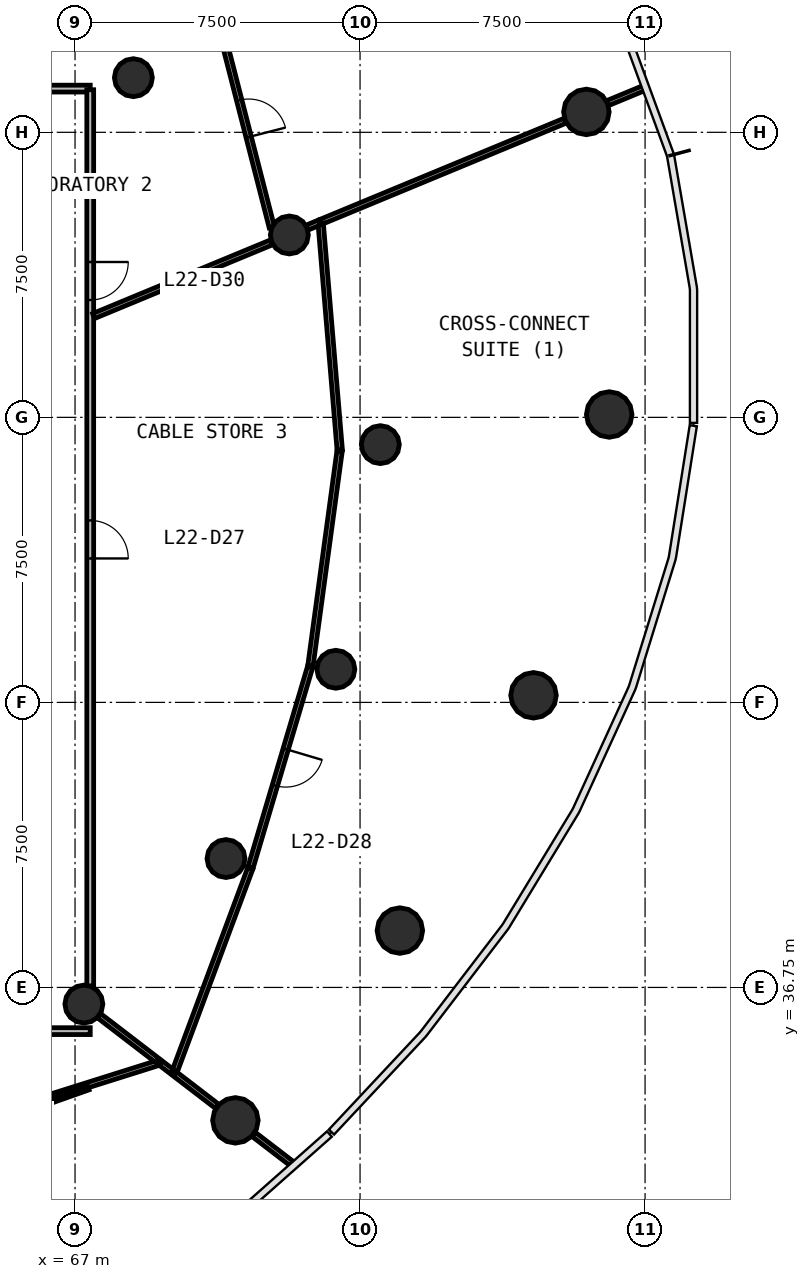
"""IFC4 building model, lengths in metres.
Left out: names, types, materials, properties, quantities, classifications, styles, units other than length and angle.
Written with IfcOpenShell. Run it as: python <this file> out.ifc"""

import sys

from ifc_helpers import new_model, si_unit, direction, frame, frame_2d, origin, origin_2d, place, context, subcontext, project, spatial, rectangle, circle, extrude, source, transform, mapped, element, fill, save


model = new_model("IFC4")
c1 = context("Model", 3, precision=1e-05, world=origin(), true_north=direction((0.0, 1.0)))
c2 = subcontext(c1, "Body", "Model", "MODEL_VIEW")
j1 = project(units=[si_unit("LENGTHUNIT", "METRE"), si_unit("PLANEANGLEUNIT", "RADIAN")], contexts=[c1])
p1 = place(None, origin())
s1 = spatial("IfcSite", under=j1, at=p1, CompositionType="ELEMENT")
p2 = place(p1, origin())
s2 = spatial("IfcBuilding", under=s1, at=p2, CompositionType="ELEMENT")
p3 = place(p2, frame((0.0, 0.0, 96.2)))
s3 = spatial("IfcBuildingStorey", under=s2, at=p3, CompositionType="ELEMENT", Elevation=96.2)
m1 = source(origin(), c2, "Body", "SweptSolid", [
    extrude(circle(Radius=0.6, at=origin_2d()), origin(), (0.0, 0.0, 1.0), 4.1),
])
for number, where, z_axis, x_axis in (
    (1, (81.056, 51.825, 0.0), (0.0, 0.0, 1.0), (1.0, 0.0, 0.0)),
    (2, (80.456, 59.787, 0.0), (0.0, 0.0, 1.0), (1.0, 0.0, 0.0)),
    (3, (71.22, 33.252, 0.0), (0.0, 0.0, 1.0), (1.0, 0.0, 0.0)),
    (4, (75.548, 38.246, 0.0), (0.0, 0.0, 1.0), (1.0, 0.0, 0.0)),
    (5, (79.064, 44.437, 0.0), (0.0, 0.0, 1.0), (1.0, 0.0, 0.0)),
):
    element("IfcColumn", number, at=place(p3, frame(where, z_axis=z_axis, x_axis=x_axis)), inside=s3, PredefinedType="COLUMN", context=c2, shape_type="MappedRepresentation", body=[
        mapped(m1, transform((0.0, 0.0, 0.0), scale=1.0)),
    ])
m2 = source(origin(), c2, "Body", "SweptSolid", [
    extrude(circle(Radius=0.5, at=origin_2d()), origin(), (0.0, 0.0, 1.0), 4.1),
])
for number, where, z_axis, x_axis in (
    (6, (75.034, 51.032, 0.0), (0.0, 0.0, 1.0), (1.0, 0.0, 0.0)),
    (7, (72.639, 56.549, 0.0), (0.0, 0.0, 1.0), (1.0, 0.0, 0.0)),
    (8, (68.535, 60.688, 0.0), (0.0, 0.0, 1.0), (1.0, 0.0, 0.0)),
    (9, (67.232, 36.312, 0.0), (0.0, 0.0, 1.0), (1.0, 0.0, 0.0)),
    (10, (70.972, 40.141, 0.0), (0.0, 0.0, 1.0), (1.0, 0.0, 0.0)),
    (11, (73.863, 45.122, 0.0), (0.0, 0.0, 1.0), (1.0, 0.0, 0.0)),
):
    element("IfcColumn", number, at=place(p3, frame(where, z_axis=z_axis, x_axis=x_axis)), inside=s3, PredefinedType="COLUMN", context=c2, shape_type="MappedRepresentation", body=[
        mapped(m2, transform((0.0, 0.0, 0.0), scale=1.0)),
    ])
p4 = place(p3, frame((67.4, 35.6, 0.0), z_axis=(0.0, 0.0, 1.0), x_axis=(-1.0, 0.0, 0.0)))
e12 = element("IfcWall", 12, at=p4, inside=s3, PredefinedType="PARTITIONING", context=c2, shape_type="SweptSolid", body=[
    extrude(rectangle(XDim=30.8, YDim=0.18, at=frame_2d((15.4, 0.0))), origin(), (0.0, 0.0, 1.0), 2.9),
])
p5 = place(p4, frame((9.05, 0.0, 0.0)))
e13 = element("IfcOpeningElement", 13, at=p5, cuts=e12, PredefinedType="OPENING", context=c2, shape_type="SweptSolid", body=[
    extrude(rectangle(XDim=0.9, YDim=2.1, at=frame_2d((0.45, 1.05))), frame((0.0, 0.1, 0.0), z_axis=(0.0, -1.0, 0.0), x_axis=(1.0, 0.0, 0.0)), (0.0, 0.0, 1.0), 0.2),
])
p6 = place(p4, frame((6.05, 0.0, 0.0)))
e14 = element("IfcOpeningElement", 14, at=p6, cuts=e12, PredefinedType="OPENING", context=c2, shape_type="SweptSolid", body=[
    extrude(rectangle(XDim=0.9, YDim=2.1, at=frame_2d((0.45, 1.05))), frame((0.0, 0.1, 0.0), z_axis=(0.0, -1.0, 0.0), x_axis=(1.0, 0.0, 0.0)), (0.0, 0.0, 1.0), 0.2),
])
p7 = place(p4, frame((2.45, 0.0, 0.0)))
e15 = element("IfcOpeningElement", 15, at=p7, cuts=e12, PredefinedType="OPENING", context=c2, shape_type="SweptSolid", body=[
    extrude(rectangle(XDim=0.9, YDim=2.1, at=frame_2d((0.45, 1.05))), frame((0.0, 0.1, 0.0), z_axis=(0.0, -1.0, 0.0), x_axis=(1.0, 0.0, 0.0)), (0.0, 0.0, 1.0), 0.2),
])
p8 = place(p4, frame((20.95, 0.0, 0.0)))
e16 = element("IfcOpeningElement", 16, at=p8, cuts=e12, PredefinedType="OPENING", context=c2, shape_type="SweptSolid", body=[
    extrude(rectangle(XDim=1.0, YDim=2.1, at=frame_2d((0.5, 1.05))), frame((0.0, 0.1, 0.0), z_axis=(0.0, -1.0, 0.0), x_axis=(1.0, 0.0, 0.0)), (0.0, 0.0, 1.0), 0.2),
])
p9 = place(p4, frame((14.95, 0.0, 0.0)))
e17 = element("IfcOpeningElement", 17, at=p9, cuts=e12, PredefinedType="OPENING", context=c2, shape_type="SweptSolid", body=[
    extrude(rectangle(XDim=1.0, YDim=2.1, at=frame_2d((0.5, 1.05))), frame((0.0, 0.1, 0.0), z_axis=(0.0, -1.0, 0.0), x_axis=(1.0, 0.0, 0.0)), (0.0, 0.0, 1.0), 0.2),
])
p10 = place(p3, frame((36.6, 60.4, 0.0), z_axis=(0.0, 0.0, 1.0), x_axis=(1.0, 0.0, 0.0)))
e18 = element("IfcWall", 18, at=p10, inside=s3, PredefinedType="PARTITIONING", context=c2, shape_type="SweptSolid", body=[
    extrude(rectangle(XDim=30.8, YDim=0.18, at=frame_2d((15.4, 0.0))), origin(), (0.0, 0.0, 1.0), 2.9),
])
p11 = place(p10, frame((17.35, 0.0, 0.0)))
e19 = element("IfcOpeningElement", 19, at=p11, cuts=e18, PredefinedType="OPENING", context=c2, shape_type="SweptSolid", body=[
    extrude(rectangle(XDim=1.0, YDim=2.1, at=frame_2d((0.5, 1.05))), frame((0.0, 0.1, 0.0), z_axis=(0.0, -1.0, 0.0), x_axis=(1.0, 0.0, 0.0)), (0.0, 0.0, 1.0), 0.2),
])
p12 = place(p10, frame((14.95, 0.0, 0.0)))
e20 = element("IfcOpeningElement", 20, at=p12, cuts=e18, PredefinedType="OPENING", context=c2, shape_type="SweptSolid", body=[
    extrude(rectangle(XDim=1.0, YDim=2.1, at=frame_2d((0.5, 1.05))), frame((0.0, 0.1, 0.0), z_axis=(0.0, -1.0, 0.0), x_axis=(1.0, 0.0, 0.0)), (0.0, 0.0, 1.0), 0.2),
])
p13 = place(p3, frame((67.4, 60.37, 0.0), z_axis=(0.0, 0.0, 1.0), x_axis=(0.0, -1.0, 0.0)))
e21 = element("IfcWall", 21, at=p13, inside=s3, PredefinedType="PARTITIONING", context=c2, shape_type="SweptSolid", body=[
    extrude(rectangle(XDim=23.583, YDim=0.18, at=frame_2d((11.791, 0.0))), origin(), (0.0, 0.0, 1.0), 2.9),
])
p14 = place(p13, frame((11.333, 0.0, 0.0)))
e22 = element("IfcOpeningElement", 22, at=p14, cuts=e21, PredefinedType="OPENING", context=c2, shape_type="SweptSolid", body=[
    extrude(rectangle(XDim=1.0, YDim=2.1, at=frame_2d((0.5, 1.05))), frame((0.0, 0.1, 0.0), z_axis=(0.0, -1.0, 0.0), x_axis=(1.0, 0.0, 0.0)), (0.0, 0.0, 1.0), 0.2),
])
p15 = place(p13, frame((4.532, 0.0, 0.0)))
e23 = element("IfcOpeningElement", 23, at=p15, cuts=e21, PredefinedType="OPENING", context=c2, shape_type="SweptSolid", body=[
    extrude(rectangle(XDim=1.0, YDim=2.1, at=frame_2d((0.5, 1.05))), frame((0.0, 0.1, 0.0), z_axis=(0.0, -1.0, 0.0), x_axis=(1.0, 0.0, 0.0)), (0.0, 0.0, 1.0), 0.2),
])
p16 = place(p3, frame((73.461, 56.889, 0.0), z_axis=(0.0, 0.0, 1.0), x_axis=(0.923875437127, 0.382693319347, 0.0)))
e24 = element("IfcWall", 24, at=p16, inside=s3, PredefinedType="PARTITIONING", context=c2, shape_type="SweptSolid", body=[
    extrude(rectangle(XDim=6.966, YDim=0.14, at=frame_2d((3.483, 0.0))), origin(), (0.0, 0.0, 1.0), 2.9),
])
p17 = place(p3, frame((73.966, 50.892, 0.0), z_axis=(0.0, 0.0, 1.0), x_axis=(-0.083895623438, 0.996474547777, 0.0)))
e25 = element("IfcWall", 25, at=p17, inside=s3, PredefinedType="PARTITIONING", context=c2, shape_type="SweptSolid", body=[
    extrude(rectangle(XDim=5.989, YDim=0.14, at=frame_2d((2.994, 0.0))), origin(), (0.0, 0.0, 1.0), 2.9),
])
p18 = place(p3, frame((63.525, 32.981, 0.0), z_axis=(0.0, 0.0, 1.0), x_axis=(0.953823490885, 0.300367688402, 0.0)))
e26 = element("IfcWall", 26, at=p18, inside=s3, PredefinedType="PARTITIONING", context=c2, shape_type="SweptSolid", body=[
    extrude(rectangle(XDim=5.983, YDim=0.14, at=frame_2d((2.992, 0.0))), origin(), (0.0, 0.0, 1.0), 2.9),
])
p19 = place(p3, frame((70.742, 62.346, 0.0), z_axis=(0.0, 0.0, 1.0), x_axis=(0.248578766965, -0.968611685153, 0.0)))
e27 = element("IfcWall", 27, at=p19, inside=s3, PredefinedType="PARTITIONING", context=c2, shape_type="SweptSolid", body=[
    extrude(rectangle(XDim=5.775, YDim=0.14, at=frame_2d((2.887, 0.0))), origin(), (0.0, 0.0, 1.0), 2.9),
])
p20 = place(p19, frame((2.325, 0.0, 0.0)))
e28 = element("IfcOpeningElement", 28, at=p20, cuts=e27, PredefinedType="OPENING", context=c2, shape_type="SweptSolid", body=[
    extrude(rectangle(XDim=1.0, YDim=2.1, at=frame_2d((0.5, 1.05))), frame((0.0, 0.08, 0.0), z_axis=(0.0, -1.0, 0.0), x_axis=(1.0, 0.0, 0.0)), (0.0, 0.0, 1.0), 0.16),
])
p21 = place(p3, frame((69.604, 34.492, 0.0), z_axis=(0.0, 0.0, 1.0), x_axis=(0.349032218766, 0.937110724655, 0.0)))
e29 = element("IfcWall", 29, at=p21, inside=s3, PredefinedType="PARTITIONING", context=c2, shape_type="SweptSolid", body=[
    extrude(rectangle(XDim=5.747, YDim=0.14, at=frame_2d((2.874, 0.0))), origin(), (0.0, 0.0, 1.0), 2.9),
])
p22 = place(p3, frame((73.194, 45.21, 0.0), z_axis=(0.0, 0.0, 1.0), x_axis=(0.134605146381, 0.99089931606, 0.0)))
e30 = element("IfcWall", 30, at=p22, inside=s3, PredefinedType="PARTITIONING", context=c2, shape_type="SweptSolid", body=[
    extrude(rectangle(XDim=5.704, YDim=0.14, at=frame_2d((2.852, 0.0))), origin(), (0.0, 0.0, 1.0), 2.9),
])
p23 = place(p3, frame((73.185, 45.181, 0.0), z_axis=(0.0, 0.0, 1.0), x_axis=(-0.284737802329, -0.958605437041, 0.0)))
e31 = element("IfcWall", 31, at=p23, inside=s3, PredefinedType="PARTITIONING", context=c2, shape_type="SweptSolid", body=[
    extrude(rectangle(XDim=5.503, YDim=0.14, at=frame_2d((2.751, 0.0))), origin(), (0.0, 0.0, 1.0), 2.9),
])
p24 = place(p23, frame((2.253, 0.0, 0.0)))
e32 = element("IfcOpeningElement", 32, at=p24, cuts=e31, PredefinedType="OPENING", context=c2, shape_type="SweptSolid", body=[
    extrude(rectangle(XDim=1.0, YDim=2.1, at=frame_2d((0.5, 1.05))), frame((0.0, 0.08, 0.0), z_axis=(0.0, -1.0, 0.0), x_axis=(1.0, 0.0, 0.0)), (0.0, 0.0, 1.0), 0.16),
])
p25 = place(p3, frame((67.49, 54.416, 0.0), z_axis=(0.0, 0.0, 1.0), x_axis=(0.923890025086, 0.382658100067, 0.0)))
e33 = element("IfcWall", 33, at=p25, inside=s3, PredefinedType="PARTITIONING", context=c2, shape_type="SweptSolid", body=[
    extrude(rectangle(XDim=5.068, YDim=0.14, at=frame_2d((2.534, 0.0))), origin(), (0.0, 0.0, 1.0), 2.9),
])
p26 = place(p3, frame((69.255, 34.76, 0.0), z_axis=(0.0, 0.0, 1.0), x_axis=(0.793638535871, -0.608389574517, 0.0)))
e34 = element("IfcWall", 34, at=p26, inside=s3, PredefinedType="PARTITIONING", context=c2, shape_type="SweptSolid", body=[
    extrude(rectangle(XDim=0.366, YDim=0.14, at=frame_2d((0.183, 0.0))), origin(), (0.0, 0.0, 1.0), 2.9),
])
p27 = place(p3, frame((67.633, 36.005, 0.0), z_axis=(0.0, 0.0, 1.0), x_axis=(0.793347691058, -0.608768791161, 0.0)))
e35 = element("IfcWall", 35, at=p27, inside=s3, PredefinedType="PARTITIONING", context=c2, shape_type="SweptSolid", body=[
    extrude(rectangle(XDim=1.93, YDim=0.14, at=frame_2d((0.965, 0.0))), origin(), (0.0, 0.0, 1.0), 2.9),
])
p28 = place(p3, frame((69.628, 34.474, 0.0), z_axis=(0.0, 0.0, 1.0), x_axis=(0.793412961963, -0.608683720654, 0.0)))
e36 = element("IfcWall", 36, at=p28, inside=s3, PredefinedType="PARTITIONING", context=c2, shape_type="SweptSolid", body=[
    extrude(rectangle(XDim=1.402, YDim=0.14, at=frame_2d((0.701, 0.0))), origin(), (0.0, 0.0, 1.0), 2.9),
])
p29 = place(p3, frame((71.699, 32.884, 0.0), z_axis=(0.0, 0.0, 1.0), x_axis=(0.793289842444, -0.60884417208, 0.0)))
e37 = element("IfcWall", 37, at=p29, inside=s3, PredefinedType="PARTITIONING", context=c2, shape_type="SweptSolid", body=[
    extrude(rectangle(XDim=1.267, YDim=0.14, at=frame_2d((0.633, 0.0))), origin(), (0.0, 0.0, 1.0), 2.9),
])
p30 = place(p3, frame((81.014, 60.018, 0.0), z_axis=(0.0, 0.0, 1.0), x_axis=(0.923912211219, 0.382604529457, 0.0)))
e38 = element("IfcWall", 38, at=p30, inside=s3, PredefinedType="PARTITIONING", context=c2, shape_type="SweptSolid", body=[
    extrude(rectangle(XDim=1.052, YDim=0.14, at=frame_2d((0.526, 0.0))), origin(), (0.0, 0.0, 1.0), 2.9),
])
p31 = place(p3, frame((73.106, 56.742, 0.0), z_axis=(0.0, 0.0, 1.0), x_axis=(0.923646914224, 0.383244540529, 0.0)))
e39 = element("IfcWall", 39, at=p31, inside=s3, PredefinedType="PARTITIONING", context=c2, shape_type="SweptSolid", body=[
    extrude(rectangle(XDim=0.354, YDim=0.14, at=frame_2d((0.177, 0.0))), origin(), (0.0, 0.0, 1.0), 2.9),
])
p32 = place(p3, frame((65.368, 33.411, 0.0), z_axis=(0.0, 0.0, 1.0), x_axis=(0.942711024934, 0.33361043669, 0.0)))
e40 = element("IfcWall", 40, at=p32, inside=s3, PredefinedType="PARTITIONING", context=c2, shape_type="SweptSolid", body=[
    extrude(rectangle(XDim=2.1, YDim=0.12, at=frame_2d((1.05, 0.0))), origin(), (0.0, 0.0, 1.0), 2.9),
])
m3 = source(origin(), c2, "Body", "SweptSolid", [
    extrude(rectangle(XDim=1.0, YDim=2.1, at=frame_2d((0.5, 1.05))), frame((0.0, 0.025, 0.0), z_axis=(0.0, -1.0, 0.0), x_axis=(1.0, 0.0, 0.0)), (0.0, 0.0, 1.0), 0.05),
])
p33 = place(p14, origin())
e41 = element("IfcDoor", 41, at=p33, inside=s3, OperationType="SINGLE_SWING_RIGHT", PredefinedType="DOOR", context=c2, shape_type="MappedRepresentation", body=[
    mapped(m3, transform((0.0, 0.0, 0.0), scale=1.0)),
])
fill(e22, e41)
p34 = place(p24, origin())
e42 = element("IfcDoor", 42, at=p34, inside=s3, OperationType="SINGLE_SWING_LEFT", PredefinedType="DOOR", context=c2, shape_type="MappedRepresentation", body=[
    mapped(m3, transform((0.0, 0.0, 0.0), scale=1.0)),
])
fill(e32, e42)
p35 = place(p15, origin())
e43 = element("IfcDoor", 43, at=p35, inside=s3, OperationType="SINGLE_SWING_LEFT", PredefinedType="DOOR", context=c2, shape_type="MappedRepresentation", body=[
    mapped(m3, transform((0.0, 0.0, 0.0), scale=1.0)),
])
fill(e23, e43)
p36 = place(p20, origin())
e44 = element("IfcDoor", 44, at=p36, inside=s3, OperationType="SINGLE_SWING_RIGHT", PredefinedType="DOOR", context=c2, shape_type="MappedRepresentation", body=[
    mapped(m3, transform((0.0, 0.0, 0.0), scale=1.0)),
])
fill(e28, e44)
save(model, sys.argv[1])
